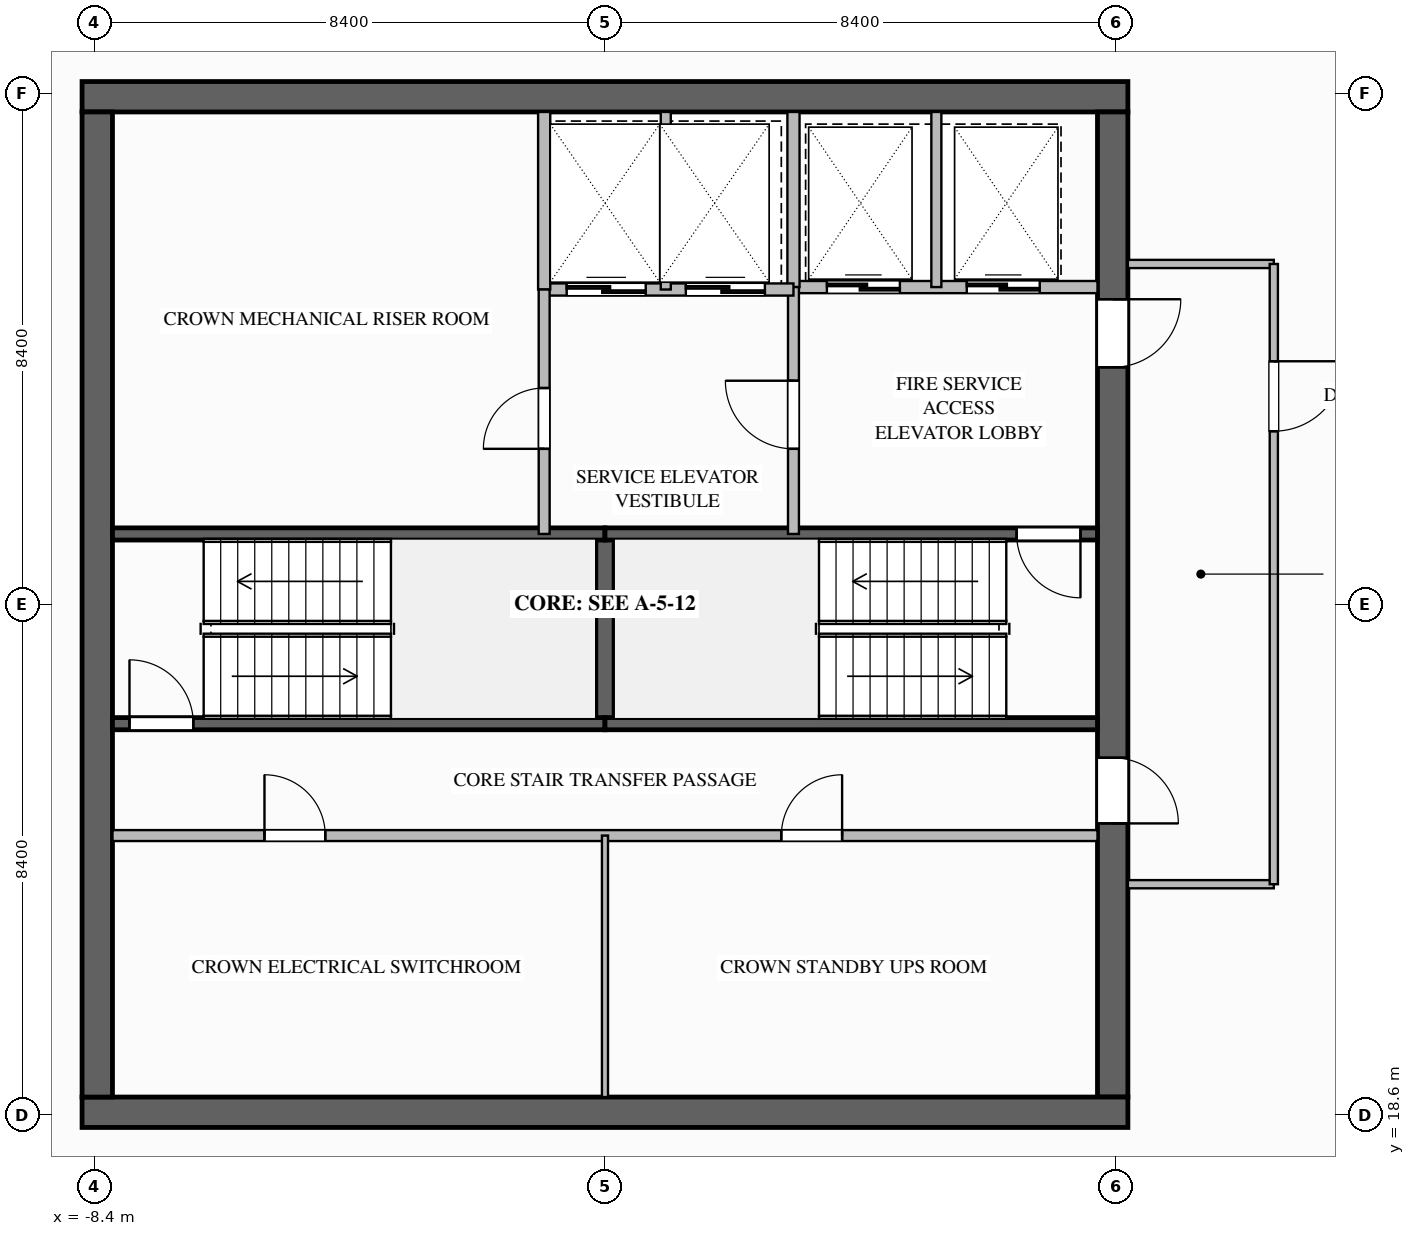
"""IFC4 building model, lengths in metres.
Left out: names, types, materials, properties, quantities, classifications, styles, units other than length and angle.
Written with IfcOpenShell. Run it as: python <this file> out.ifc"""

import sys

from ifc_helpers import new_model, si_unit, direction, frame, frame_2d, origin, place, context, subcontext, project, spatial, rectangle, extrude, element, fill, save


model = new_model("IFC4")
c1 = context("Model", 3, precision=1e-05, world=origin(), true_north=direction((0.0, 1.0)))
c2 = subcontext(c1, "Body", "Model", "MODEL_VIEW")
j1 = project(units=[si_unit("LENGTHUNIT", "METRE"), si_unit("PLANEANGLEUNIT", "RADIAN")], contexts=[c1])
p1 = place(None, origin())
s1 = spatial("IfcSite", under=j1, at=p1, CompositionType="ELEMENT")
p2 = place(p1, origin())
s2 = spatial("IfcBuilding", under=s1, at=p2, CompositionType="ELEMENT")
p3 = place(p2, frame((0.0, 0.0, 307.2)))
s3 = spatial("IfcBuildingStorey", under=s2, at=p3, CompositionType="ELEMENT", Elevation=307.2)
p4 = place(p3, frame((-8.6, 35.35, 0.0), z_axis=(0.0, 0.0, 1.0), x_axis=(1.0, 0.0, 0.0)))
e1 = element("IfcWall", 1, at=p4, inside=s3, PredefinedType="SHEAR", context=c2, shape_type="SweptSolid", body=[
    extrude(rectangle(XDim=17.2, YDim=0.5, at=frame_2d((8.6, 0.0))), origin(), (0.0, 0.0, 1.0), 4.2),
])
p5 = place(p3, frame((8.35, 35.1, 0.0), z_axis=(0.0, 0.0, 1.0), x_axis=(0.0, -1.0, 0.0)))
e2 = element("IfcWall", 2, at=p5, inside=s3, PredefinedType="SHEAR", context=c2, shape_type="SweptSolid", body=[
    extrude(rectangle(XDim=16.2, YDim=0.5, at=frame_2d((8.1, 0.0))), origin(), (0.0, 0.0, 1.0), 4.2),
])
p6 = place(p5, frame((3.08, 0.0, 0.0)))
e3 = element("IfcOpeningElement", 3, at=p6, cuts=e2, PredefinedType="OPENING", context=c2, shape_type="SweptSolid", body=[
    extrude(rectangle(XDim=1.12, YDim=2.1, at=frame_2d((0.56, 1.05))), frame((0.0, 0.26, 0.0), z_axis=(0.0, -1.0, 0.0), x_axis=(1.0, 0.0, 0.0)), (0.0, 0.0, 1.0), 0.52),
])
p7 = place(p5, frame((10.62, 0.0, 0.0)))
e4 = element("IfcOpeningElement", 4, at=p7, cuts=e2, PredefinedType="OPENING", context=c2, shape_type="SweptSolid", body=[
    extrude(rectangle(XDim=1.08, YDim=2.04, at=frame_2d((0.54, 1.02))), frame((0.0, 0.26, 0.0), z_axis=(0.0, -1.0, 0.0), x_axis=(1.0, 0.0, 0.0)), (0.0, 0.0, 1.0), 0.52),
])
p8 = place(p3, frame((8.6, 18.65, 0.0), z_axis=(0.0, 0.0, 1.0), x_axis=(-1.0, 0.0, 0.0)))
e5 = element("IfcWall", 5, at=p8, inside=s3, PredefinedType="SHEAR", context=c2, shape_type="SweptSolid", body=[
    extrude(rectangle(XDim=17.2, YDim=0.5, at=frame_2d((8.6, 0.0))), origin(), (0.0, 0.0, 1.0), 4.2),
])
p9 = place(p3, frame((-8.35, 18.9, 0.0), z_axis=(0.0, 0.0, 1.0), x_axis=(0.0, 1.0, 0.0)))
e6 = element("IfcWall", 6, at=p9, inside=s3, PredefinedType="SHEAR", context=c2, shape_type="SweptSolid", body=[
    extrude(rectangle(XDim=16.2, YDim=0.5, at=frame_2d((8.1, 0.0))), origin(), (0.0, 0.0, 1.0), 4.2),
])
p10 = place(p3, frame((0.0, 25.04, 0.0), z_axis=(0.0, 0.0, 1.0), x_axis=(0.0, 1.0, 0.0)))
e7 = element("IfcWall", 7, at=p10, inside=s3, PredefinedType="SOLIDWALL", context=c2, shape_type="SweptSolid", body=[
    extrude(rectangle(XDim=3.12, YDim=0.3, at=frame_2d((1.56, 0.0))), origin(), (0.0, 0.0, 1.0), 3.88),
])
p11 = place(p3, frame((-8.1, 25.04, 0.0), z_axis=(0.0, 0.0, 1.0), x_axis=(1.0, 0.0, 0.0)))
e8 = element("IfcWall", 8, at=p11, inside=s3, PredefinedType="SOLIDWALL", context=c2, shape_type="SweptSolid", body=[
    extrude(rectangle(XDim=8.1, YDim=0.2, at=frame_2d((4.05, 0.0))), origin(), (0.0, 0.0, 1.0), 3.88),
])
p12 = place(p11, frame((0.28, 0.0, 0.0)))
e9 = element("IfcOpeningElement", 9, at=p12, cuts=e8, PredefinedType="OPENING", context=c2, shape_type="SweptSolid", body=[
    extrude(rectangle(XDim=1.05, YDim=2.1, at=frame_2d((0.525, 1.05))), frame((0.0, 0.11, 0.0), z_axis=(0.0, -1.0, 0.0), x_axis=(1.0, 0.0, 0.0)), (0.0, 0.0, 1.0), 0.22),
])
for number, where, z_axis, x_axis in (
    (10, (-8.1, 28.16, 0.0), (0.0, 0.0, 1.0), (1.0, 0.0, 0.0)),
    (11, (0.0, 25.04, 0.0), (0.0, 0.0, 1.0), (1.0, 0.0, 0.0)),
):
    element("IfcWall", number, at=place(p3, frame(where, z_axis=z_axis, x_axis=x_axis)), inside=s3, PredefinedType="SOLIDWALL", context=c2, shape_type="SweptSolid", body=[
        extrude(rectangle(XDim=8.1, YDim=0.2, at=frame_2d((4.05, 0.0))), origin(), (0.0, 0.0, 1.0), 3.88),
    ])
p13 = place(p3, frame((8.1, 28.16, 0.0), z_axis=(0.0, 0.0, 1.0), x_axis=(-1.0, 0.0, 0.0)))
e12 = element("IfcWall", 12, at=p13, inside=s3, PredefinedType="SOLIDWALL", context=c2, shape_type="SweptSolid", body=[
    extrude(rectangle(XDim=8.1, YDim=0.2, at=frame_2d((4.05, 0.0))), origin(), (0.0, 0.0, 1.0), 3.88),
])
p14 = place(p13, frame((0.28, 0.0, 0.0)))
e13 = element("IfcOpeningElement", 13, at=p14, cuts=e12, PredefinedType="OPENING", context=c2, shape_type="SweptSolid", body=[
    extrude(rectangle(XDim=1.05, YDim=2.1, at=frame_2d((0.525, 1.05))), frame((0.0, 0.11, 0.0), z_axis=(0.0, -1.0, 0.0), x_axis=(1.0, 0.0, 0.0)), (0.0, 0.0, 1.0), 0.22),
])
p15 = place(p3, frame((3.1, 32.22, 0.0), z_axis=(0.0, 0.0, 1.0), x_axis=(1.0, 0.0, 0.0)))
e14 = element("IfcWall", 14, at=p15, inside=s3, PredefinedType="SOLIDWALL", context=c2, shape_type="SweptSolid", body=[
    extrude(rectangle(XDim=5.0, YDim=0.2, at=frame_2d((2.5, 0.0))), origin(), (0.0, 0.0, 1.0), 3.88),
])
p16 = place(p15, frame((0.55, 0.0, 0.0)))
e15 = element("IfcOpeningElement", 15, at=p16, cuts=e14, PredefinedType="OPENING", context=c2, shape_type="SweptSolid", body=[
    extrude(rectangle(XDim=1.2, YDim=2.2, at=frame_2d((0.6, 1.1))), frame((0.0, 0.11, 0.0), z_axis=(0.0, -1.0, 0.0), x_axis=(1.0, 0.0, 0.0)), (0.0, 0.0, 1.0), 0.22),
])
p17 = place(p15, frame((2.85, 0.0, 0.0)))
e16 = element("IfcOpeningElement", 16, at=p17, cuts=e14, PredefinedType="OPENING", context=c2, shape_type="SweptSolid", body=[
    extrude(rectangle(XDim=1.2, YDim=2.2, at=frame_2d((0.6, 1.1))), frame((0.0, 0.11, 0.0), z_axis=(0.0, -1.0, 0.0), x_axis=(1.0, 0.0, 0.0)), (0.0, 0.0, 1.0), 0.22),
])
p18 = place(p3, frame((3.1, 32.22, 0.0), z_axis=(0.0, 0.0, 1.0), x_axis=(0.0, 1.0, 0.0)))
e17 = element("IfcWall", 17, at=p18, inside=s3, PredefinedType="SOLIDWALL", context=c2, shape_type="SweptSolid", body=[
    extrude(rectangle(XDim=2.88, YDim=0.2, at=frame_2d((1.44, 0.0))), origin(), (0.0, 0.0, 1.0), 3.88),
])
p19 = place(p3, frame((5.45, 32.22, 0.0), z_axis=(0.0, 0.0, 1.0), x_axis=(0.0, 1.0, 0.0)))
e18 = element("IfcWall", 18, at=p19, inside=s3, PredefinedType="PARTITIONING", context=c2, shape_type="SweptSolid", body=[
    extrude(rectangle(XDim=2.88, YDim=0.165, at=frame_2d((1.44, 0.0))), origin(), (0.0, 0.0, 1.0), 3.88),
])
p20 = place(p3, frame((3.1, 28.16, 0.0), z_axis=(0.0, 0.0, 1.0), x_axis=(0.0, 1.0, 0.0)))
e19 = element("IfcWall", 19, at=p20, inside=s3, PredefinedType="SOLIDWALL", context=c2, shape_type="SweptSolid", body=[
    extrude(rectangle(XDim=4.06, YDim=0.18, at=frame_2d((2.03, 0.0))), origin(), (0.0, 0.0, 1.0), 3.88),
])
p21 = place(p20, frame((1.4, 0.0, 0.0)))
e20 = element("IfcOpeningElement", 20, at=p21, cuts=e19, PredefinedType="OPENING", context=c2, shape_type="SweptSolid", body=[
    extrude(rectangle(XDim=1.12, YDim=2.1, at=frame_2d((0.56, 1.05))), frame((0.0, 0.1, 0.0), z_axis=(0.0, -1.0, 0.0), x_axis=(1.0, 0.0, 0.0)), (0.0, 0.0, 1.0), 0.2),
])
p22 = place(p3, frame((-1.0, 32.18, 0.0), z_axis=(0.0, 0.0, 1.0), x_axis=(1.0, 0.0, 0.0)))
e21 = element("IfcWall", 21, at=p22, inside=s3, PredefinedType="SOLIDWALL", context=c2, shape_type="SweptSolid", body=[
    extrude(rectangle(XDim=4.1, YDim=0.2, at=frame_2d((2.05, 0.0))), origin(), (0.0, 0.0, 1.0), 3.88),
])
p23 = place(p22, frame((0.37, 0.0, 0.0)))
e22 = element("IfcOpeningElement", 22, at=p23, cuts=e21, PredefinedType="OPENING", context=c2, shape_type="SweptSolid", body=[
    extrude(rectangle(XDim=1.3, YDim=2.2, at=frame_2d((0.65, 1.1))), frame((0.0, 0.11, 0.0), z_axis=(0.0, -1.0, 0.0), x_axis=(1.0, 0.0, 0.0)), (0.0, 0.0, 1.0), 0.22),
])
p24 = place(p22, frame((2.33, 0.0, 0.0)))
e23 = element("IfcOpeningElement", 23, at=p24, cuts=e21, PredefinedType="OPENING", context=c2, shape_type="SweptSolid", body=[
    extrude(rectangle(XDim=1.3, YDim=2.2, at=frame_2d((0.65, 1.1))), frame((0.0, 0.11, 0.0), z_axis=(0.0, -1.0, 0.0), x_axis=(1.0, 0.0, 0.0)), (0.0, 0.0, 1.0), 0.22),
])
p25 = place(p3, frame((-1.0, 32.18, 0.0), z_axis=(0.0, 0.0, 1.0), x_axis=(0.0, 1.0, 0.0)))
e24 = element("IfcWall", 24, at=p25, inside=s3, PredefinedType="SOLIDWALL", context=c2, shape_type="SweptSolid", body=[
    extrude(rectangle(XDim=2.92, YDim=0.2, at=frame_2d((1.46, 0.0))), origin(), (0.0, 0.0, 1.0), 3.88),
])
p26 = place(p3, frame((1.0, 32.18, 0.0), z_axis=(0.0, 0.0, 1.0), x_axis=(0.0, 1.0, 0.0)))
e25 = element("IfcWall", 25, at=p26, inside=s3, PredefinedType="PARTITIONING", context=c2, shape_type="SweptSolid", body=[
    extrude(rectangle(XDim=2.92, YDim=0.165, at=frame_2d((1.46, 0.0))), origin(), (0.0, 0.0, 1.0), 3.88),
])
p27 = place(p3, frame((-1.0, 28.16, 0.0), z_axis=(0.0, 0.0, 1.0), x_axis=(0.0, 1.0, 0.0)))
e26 = element("IfcWall", 26, at=p27, inside=s3, PredefinedType="SOLIDWALL", context=c2, shape_type="SweptSolid", body=[
    extrude(rectangle(XDim=4.02, YDim=0.18, at=frame_2d((2.01, 0.0))), origin(), (0.0, 0.0, 1.0), 3.88),
])
p28 = place(p27, frame((1.4, 0.0, 0.0)))
e27 = element("IfcOpeningElement", 27, at=p28, cuts=e26, PredefinedType="OPENING", context=c2, shape_type="SweptSolid", body=[
    extrude(rectangle(XDim=1.0, YDim=2.1, at=frame_2d((0.5, 1.05))), frame((0.0, 0.1, 0.0), z_axis=(0.0, -1.0, 0.0), x_axis=(1.0, 0.0, 0.0)), (0.0, 0.0, 1.0), 0.2),
])
p29 = place(p3, frame((-8.1, 23.2, 0.0), z_axis=(0.0, 0.0, 1.0), x_axis=(1.0, 0.0, 0.0)))
e28 = element("IfcWall", 28, at=p29, inside=s3, PredefinedType="SOLIDWALL", context=c2, shape_type="SweptSolid", body=[
    extrude(rectangle(XDim=16.2, YDim=0.18, at=frame_2d((8.1, 0.0))), origin(), (0.0, 0.0, 1.0), 3.88),
])
p30 = place(p29, frame((2.5, 0.0, 0.0)))
e29 = element("IfcOpeningElement", 29, at=p30, cuts=e28, PredefinedType="OPENING", context=c2, shape_type="SweptSolid", body=[
    extrude(rectangle(XDim=1.0, YDim=2.1, at=frame_2d((0.5, 1.05))), frame((0.0, 0.1, 0.0), z_axis=(0.0, -1.0, 0.0), x_axis=(1.0, 0.0, 0.0)), (0.0, 0.0, 1.0), 0.2),
])
p31 = place(p29, frame((11.0, 0.0, 0.0)))
e30 = element("IfcOpeningElement", 30, at=p31, cuts=e28, PredefinedType="OPENING", context=c2, shape_type="SweptSolid", body=[
    extrude(rectangle(XDim=1.0, YDim=2.1, at=frame_2d((0.5, 1.05))), frame((0.0, 0.1, 0.0), z_axis=(0.0, -1.0, 0.0), x_axis=(1.0, 0.0, 0.0)), (0.0, 0.0, 1.0), 0.2),
])
p32 = place(p3, frame((0.0, 18.9, 0.0), z_axis=(0.0, 0.0, 1.0), x_axis=(0.0, 1.0, 0.0)))
e31 = element("IfcWall", 31, at=p32, inside=s3, PredefinedType="PARTITIONING", context=c2, shape_type="SweptSolid", body=[
    extrude(rectangle(XDim=4.3, YDim=0.1, at=frame_2d((2.15, 0.0))), origin(), (0.0, 0.0, 1.0), 3.88),
])
for number, where, z_axis, x_axis in (
    (32, (8.6, 22.4, 0.0), (0.0, 0.0, 1.0), (1.0, 0.0, 0.0)),
    (33, (8.6, 32.6, 0.0), (0.0, 0.0, 1.0), (1.0, 0.0, 0.0)),
):
    element("IfcWall", number, at=place(p3, frame(where, z_axis=z_axis, x_axis=x_axis)), inside=s3, PredefinedType="PARTITIONING", context=c2, shape_type="SweptSolid", body=[
        extrude(rectangle(XDim=2.4, YDim=0.135, at=frame_2d((1.2, 0.0))), origin(), (0.0, 0.0, 1.0), 3.88),
    ])
p33 = place(p3, frame((11.0, 32.6, 0.0), z_axis=(0.0, 0.0, 1.0), x_axis=(0.0, -1.0, 0.0)))
e34 = element("IfcWall", 34, at=p33, inside=s3, PredefinedType="PARTITIONING", context=c2, shape_type="SweptSolid", body=[
    extrude(rectangle(XDim=10.2, YDim=0.135, at=frame_2d((5.1, 0.0))), origin(), (0.0, 0.0, 1.0), 3.88),
])
p34 = place(p33, frame((1.6, 0.0, 0.0)))
e35 = element("IfcOpeningElement", 35, at=p34, cuts=e34, PredefinedType="OPENING", context=c2, shape_type="SweptSolid", body=[
    extrude(rectangle(XDim=1.15, YDim=2.15, at=frame_2d((0.575, 1.075))), frame((0.0, 0.077, 0.0), z_axis=(0.0, -1.0, 0.0), x_axis=(1.0, 0.0, 0.0)), (0.0, 0.0, 1.0), 0.155),
])
p35 = place(p12, origin())
e36 = element("IfcDoor", 36, at=p35, inside=s3, OperationType="SINGLE_SWING_LEFT", PredefinedType="DOOR", context=c2, shape_type="SweptSolid", body=[
    extrude(rectangle(XDim=1.05, YDim=2.1, at=frame_2d((0.525, 1.05))), frame((0.0, 0.025, 0.0), z_axis=(0.0, -1.0, 0.0), x_axis=(1.0, 0.0, 0.0)), (0.0, 0.0, 1.0), 0.05),
])
fill(e9, e36)
p36 = place(p14, origin())
e37 = element("IfcDoor", 37, at=p36, inside=s3, OperationType="SINGLE_SWING_LEFT", PredefinedType="DOOR", context=c2, shape_type="SweptSolid", body=[
    extrude(rectangle(XDim=1.05, YDim=2.1, at=frame_2d((0.525, 1.05))), frame((0.0, 0.025, 0.0), z_axis=(0.0, -1.0, 0.0), x_axis=(1.0, 0.0, 0.0)), (0.0, 0.0, 1.0), 0.05),
])
fill(e13, e37)
p37 = place(p16, origin())
e38 = element("IfcDoor", 38, at=p37, inside=s3, OperationType="SLIDING_TO_LEFT", PredefinedType="DOOR", context=c2, shape_type="SweptSolid", body=[
    extrude(rectangle(XDim=1.2, YDim=2.2, at=frame_2d((0.6, 1.1))), frame((0.0, 0.025, 0.0), z_axis=(0.0, -1.0, 0.0), x_axis=(1.0, 0.0, 0.0)), (0.0, 0.0, 1.0), 0.05),
])
fill(e15, e38)
p38 = place(p17, origin())
e39 = element("IfcDoor", 39, at=p38, inside=s3, OperationType="SLIDING_TO_LEFT", PredefinedType="DOOR", context=c2, shape_type="SweptSolid", body=[
    extrude(rectangle(XDim=1.2, YDim=2.2, at=frame_2d((0.6, 1.1))), frame((0.0, 0.025, 0.0), z_axis=(0.0, -1.0, 0.0), x_axis=(1.0, 0.0, 0.0)), (0.0, 0.0, 1.0), 0.05),
])
fill(e16, e39)
p39 = place(p21, origin())
e40 = element("IfcDoor", 40, at=p39, inside=s3, OperationType="SINGLE_SWING_RIGHT", PredefinedType="DOOR", context=c2, shape_type="SweptSolid", body=[
    extrude(rectangle(XDim=1.12, YDim=2.1, at=frame_2d((0.56, 1.05))), frame((0.0, 0.025, 0.0), z_axis=(0.0, -1.0, 0.0), x_axis=(1.0, 0.0, 0.0)), (0.0, 0.0, 1.0), 0.05),
])
fill(e20, e40)
p40 = place(p6, origin())
e41 = element("IfcDoor", 41, at=p40, inside=s3, OperationType="SINGLE_SWING_LEFT", PredefinedType="DOOR", context=c2, shape_type="SweptSolid", body=[
    extrude(rectangle(XDim=1.12, YDim=2.1, at=frame_2d((0.56, 1.05))), frame((0.0, 0.025, 0.0), z_axis=(0.0, -1.0, 0.0), x_axis=(1.0, 0.0, 0.0)), (0.0, 0.0, 1.0), 0.05),
])
fill(e3, e41)
p41 = place(p23, origin())
e42 = element("IfcDoor", 42, at=p41, inside=s3, OperationType="SLIDING_TO_LEFT", PredefinedType="DOOR", context=c2, shape_type="SweptSolid", body=[
    extrude(rectangle(XDim=1.3, YDim=2.2, at=frame_2d((0.65, 1.1))), frame((0.0, 0.025, 0.0), z_axis=(0.0, -1.0, 0.0), x_axis=(1.0, 0.0, 0.0)), (0.0, 0.0, 1.0), 0.05),
])
fill(e22, e42)
p42 = place(p24, origin())
e43 = element("IfcDoor", 43, at=p42, inside=s3, OperationType="SLIDING_TO_LEFT", PredefinedType="DOOR", context=c2, shape_type="SweptSolid", body=[
    extrude(rectangle(XDim=1.3, YDim=2.2, at=frame_2d((0.65, 1.1))), frame((0.0, 0.025, 0.0), z_axis=(0.0, -1.0, 0.0), x_axis=(1.0, 0.0, 0.0)), (0.0, 0.0, 1.0), 0.05),
])
fill(e23, e43)
p43 = place(p28, origin())
e44 = element("IfcDoor", 44, at=p43, inside=s3, OperationType="SINGLE_SWING_LEFT", PredefinedType="DOOR", context=c2, shape_type="SweptSolid", body=[
    extrude(rectangle(XDim=1.0, YDim=2.1, at=frame_2d((0.5, 1.05))), frame((0.0, 0.025, 0.0), z_axis=(0.0, -1.0, 0.0), x_axis=(1.0, 0.0, 0.0)), (0.0, 0.0, 1.0), 0.05),
])
fill(e27, e44)
p44 = place(p7, origin())
e45 = element("IfcDoor", 45, at=p44, inside=s3, OperationType="SINGLE_SWING_RIGHT", PredefinedType="DOOR", context=c2, shape_type="SweptSolid", body=[
    extrude(rectangle(XDim=1.08, YDim=2.04, at=frame_2d((0.54, 1.02))), frame((0.0, 0.025, 0.0), z_axis=(0.0, -1.0, 0.0), x_axis=(1.0, 0.0, 0.0)), (0.0, 0.0, 1.0), 0.05),
])
fill(e4, e45)
p45 = place(p30, origin())
e46 = element("IfcDoor", 46, at=p45, inside=s3, OperationType="SINGLE_SWING_LEFT", PredefinedType="DOOR", context=c2, shape_type="SweptSolid", body=[
    extrude(rectangle(XDim=1.0, YDim=2.1, at=frame_2d((0.5, 1.05))), frame((0.0, 0.025, 0.0), z_axis=(0.0, -1.0, 0.0), x_axis=(1.0, 0.0, 0.0)), (0.0, 0.0, 1.0), 0.05),
])
fill(e29, e46)
p46 = place(p31, origin())
e47 = element("IfcDoor", 47, at=p46, inside=s3, OperationType="SINGLE_SWING_RIGHT", PredefinedType="DOOR", context=c2, shape_type="SweptSolid", body=[
    extrude(rectangle(XDim=1.0, YDim=2.1, at=frame_2d((0.5, 1.05))), frame((0.0, 0.025, 0.0), z_axis=(0.0, -1.0, 0.0), x_axis=(1.0, 0.0, 0.0)), (0.0, 0.0, 1.0), 0.05),
])
fill(e30, e47)
p47 = place(p34, origin())
e48 = element("IfcDoor", 48, at=p47, inside=s3, OperationType="SINGLE_SWING_LEFT", PredefinedType="DOOR", context=c2, shape_type="SweptSolid", body=[
    extrude(rectangle(XDim=1.15, YDim=2.15, at=frame_2d((0.575, 1.075))), frame((0.0, 0.025, 0.0), z_axis=(0.0, -1.0, 0.0), x_axis=(1.0, 0.0, 0.0)), (0.0, 0.0, 1.0), 0.05),
])
fill(e35, e48)
save(model, sys.argv[1])
